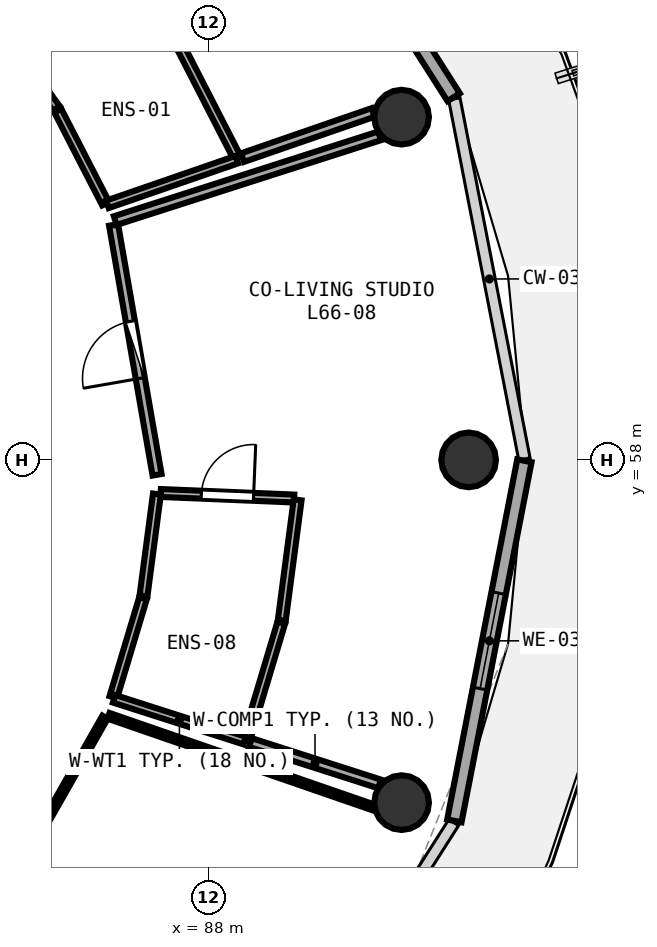
"""IFC4 building model, lengths in metres.
Left out: names, types, materials, properties, quantities, classifications, styles, units other than length and angle.
Written with IfcOpenShell. Run it as: python <this file> out.ifc"""

import sys

from ifc_helpers import new_model, si_unit, direction, frame, frame_2d, origin, origin_2d, place, context, subcontext, project, spatial, rectangle, circle, extrude, element, fill, save


model = new_model("IFC4")
c1 = context("Model", 3, precision=1e-05, world=origin(), true_north=direction((0.0, 1.0)))
c2 = subcontext(c1, "Body", "Model", "MODEL_VIEW")
j1 = project(units=[si_unit("LENGTHUNIT", "METRE"), si_unit("PLANEANGLEUNIT", "RADIAN")], contexts=[c1])
p1 = place(None, origin())
s1 = spatial("IfcSite", under=j1, at=p1, CompositionType="ELEMENT")
p2 = place(p1, origin())
s2 = spatial("IfcBuilding", under=s1, at=p2, CompositionType="ELEMENT")
p3 = place(p2, frame((0.0, 0.0, 259.95)))
s3 = spatial("IfcBuildingStorey", under=s2, at=p3, CompositionType="ELEMENT", Elevation=259.95)
for number, where, z_axis, x_axis in (
    (1, (92.28, 58.0, 0.0), (0.0, 0.0, 1.0), (1.0, 0.0, 0.0)),
    (2, (91.177, 63.636, 0.0), (0.0, 0.0, 1.0), (1.0, 0.0, 0.0)),
    (3, (91.177, 52.364, 0.0), (0.0, 0.0, 1.0), (1.0, 0.0, 0.0)),
):
    element("IfcColumn", number, at=place(p3, frame(where, z_axis=z_axis, x_axis=x_axis)), inside=s3, PredefinedType="COLUMN", context=c2, shape_type="SweptSolid", body=[
        extrude(circle(Radius=0.45, at=origin_2d()), origin(), (0.0, 0.0, 1.0), 3.75),
    ])
p4 = place(p3, frame((92.034, 63.964, 0.0), z_axis=(0.0, 0.0, 1.0), x_axis=(-0.537271968456, 0.843409053728, 0.0)))
e4 = element("IfcWall", 4, at=p4, inside=s3, PredefinedType="SOLIDWALL", context=c2, shape_type="SweptSolid", body=[
    extrude(rectangle(XDim=6.175, YDim=0.24, at=frame_2d((3.087, 0.0))), origin(), (0.0, 0.0, 1.0), 3.475),
])
p5 = place(p4, frame((2.613, 0.0, 0.0)))
e5 = element("IfcOpeningElement", 5, at=p5, cuts=e4, PredefinedType="OPENING", context=c2, shape_type="SweptSolid", body=[
    extrude(rectangle(XDim=0.95, YDim=2.1, at=frame_2d((0.475, 1.05))), frame((0.0, 0.13, 0.0), z_axis=(0.0, -1.0, 0.0), x_axis=(1.0, 0.0, 0.0)), (0.0, 0.0, 1.0), 0.26),
])
p6 = place(p4, frame((3.913, 0.0, 0.85)))
e6 = element("IfcOpeningElement", 6, at=p6, cuts=e4, PredefinedType="OPENING", context=c2, shape_type="SweptSolid", body=[
    extrude(rectangle(XDim=1.2, YDim=1.45, at=frame_2d((0.6, 0.725))), frame((0.0, 0.13, 0.0), z_axis=(0.0, -1.0, 0.0), x_axis=(1.0, 0.0, 0.0)), (0.0, 0.0, 1.0), 0.26),
])
p7 = place(p3, frame((92.045, 52.063, 0.0), z_axis=(0.0, 0.0, 1.0), x_axis=(0.190969309115, 0.981596008028, 0.0)))
e7 = element("IfcWall", 7, at=p7, inside=s3, PredefinedType="SOLIDWALL", context=c2, shape_type="SweptSolid", body=[
    extrude(rectangle(XDim=6.033, YDim=0.24, at=frame_2d((3.017, 0.0))), origin(), (0.0, 0.0, 1.0), 3.475),
])
p8 = place(p7, frame((2.216, 0.0, 0.85)))
e8 = element("IfcOpeningElement", 8, at=p8, cuts=e7, PredefinedType="OPENING", context=c2, shape_type="SweptSolid", body=[
    extrude(rectangle(XDim=1.6, YDim=1.45, at=frame_2d((0.8, 0.725))), frame((0.0, 0.13, 0.0), z_axis=(0.0, -1.0, 0.0), x_axis=(1.0, 0.0, 0.0)), (0.0, 0.0, 1.0), 0.26),
])
p9 = place(p3, frame((87.216, 57.456, 0.0), z_axis=(0.0, 0.0, 1.0), x_axis=(0.999139994921, -0.041464087462, 0.0)))
e9 = element("IfcWall", 9, at=p9, inside=s3, PredefinedType="PLUMBINGWALL", context=c2, shape_type="SweptSolid", body=[
    extrude(rectangle(XDim=2.196, YDim=0.13, at=frame_2d((1.098, 0.0))), origin(), (0.0, 0.0, 1.0), 3.175),
])
p10 = place(p9, frame((0.668, 0.0, 0.0)))
e10 = element("IfcOpeningElement", 10, at=p10, cuts=e9, PredefinedType="OPENING", context=c2, shape_type="SweptSolid", body=[
    extrude(rectangle(XDim=0.86, YDim=2.05, at=frame_2d((0.43, 1.025))), frame((0.0, 0.075, 0.0), z_axis=(0.0, -1.0, 0.0), x_axis=(1.0, 0.0, 0.0)), (0.0, 0.0, 1.0), 0.15),
])
p11 = place(p3, frame((87.156, 57.755, 0.0), z_axis=(0.0, 0.0, 1.0), x_axis=(-0.171570913007, 0.985171772743, 0.0)))
e11 = element("IfcWall", 11, at=p11, inside=s3, PredefinedType="PARTITIONING", context=c2, shape_type="SweptSolid", body=[
    extrude(rectangle(XDim=4.171, YDim=0.15, at=frame_2d((2.085, 0.0))), origin(), (0.0, 0.0, 1.0), 3.075),
])
p12 = place(p11, frame((1.61, 0.0, 0.0)))
e12 = element("IfcOpeningElement", 12, at=p12, cuts=e11, PredefinedType="OPENING", context=c2, shape_type="SweptSolid", body=[
    extrude(rectangle(XDim=0.95, YDim=2.08, at=frame_2d((0.475, 1.04))), frame((0.0, 0.085, 0.0), z_axis=(0.0, -1.0, 0.0), x_axis=(1.0, 0.0, 0.0)), (0.0, 0.0, 1.0), 0.17),
])
p13 = place(p3, frame((86.311, 62.214, 0.0), z_axis=(0.0, 0.0, 1.0), x_axis=(-0.457623641393, 0.889145996357, 0.0)))
e13 = element("IfcWall", 13, at=p13, inside=s3, PredefinedType="PLUMBINGWALL", context=c2, shape_type="SweptSolid", body=[
    extrude(rectangle(XDim=1.721, YDim=0.13, at=frame_2d((0.86, 0.0))), origin(), (0.0, 0.0, 1.0), 3.235),
])
p14 = place(p3, frame((85.502, 63.778, 0.0), z_axis=(0.0, 0.0, 1.0), x_axis=(-0.587439614451, 0.809268002193, 0.0)))
e14 = element("IfcWall", 14, at=p14, inside=s3, PredefinedType="PLUMBINGWALL", context=c2, shape_type="SweptSolid", body=[
    extrude(rectangle(XDim=1.746, YDim=0.13, at=frame_2d((0.873, 0.0))), origin(), (0.0, 0.0, 1.0), 3.075),
])
p15 = place(p3, frame((87.548, 64.772, 0.0), z_axis=(0.0, 0.0, 1.0), x_axis=(0.456453063126, -0.889747492923, 0.0)))
e15 = element("IfcWall", 15, at=p15, inside=s3, PredefinedType="PLUMBINGWALL", context=c2, shape_type="SweptSolid", body=[
    extrude(rectangle(XDim=2.035, YDim=0.13, at=frame_2d((1.017, 0.0))), origin(), (0.0, 0.0, 1.0), 3.075),
])
p16 = place(p3, frame((88.467, 62.938, 0.0), z_axis=(0.0, 0.0, 1.0), x_axis=(-0.94520115701, -0.326488549244, 0.0)))
e16 = element("IfcWall", 16, at=p16, inside=s3, PredefinedType="PLUMBINGWALL", context=c2, shape_type="SweptSolid", body=[
    extrude(rectangle(XDim=2.251, YDim=0.13, at=frame_2d((1.126, 0.0))), origin(), (0.0, 0.0, 1.0), 3.175),
])
p17 = place(p3, frame((90.709, 63.713, 0.0), z_axis=(0.0, 0.0, 1.0), x_axis=(-0.945132905081, -0.326686075207, 0.0)))
e17 = element("IfcWall", 17, at=p17, inside=s3, PredefinedType="PARTITIONING", context=c2, shape_type="SweptSolid", body=[
    extrude(rectangle(XDim=2.272, YDim=0.15, at=frame_2d((1.136, 0.0))), origin(), (0.0, 0.0, 1.0), 3.075),
])
p18 = place(p3, frame((84.994, 51.472, 0.0), z_axis=(0.0, 0.0, 1.0), x_axis=(0.494277588427, 0.869304127207, 0.0)))
e18 = element("IfcWall", 18, at=p18, inside=s3, PredefinedType="PARTITIONING", context=c2, shape_type="SweptSolid", body=[
    extrude(rectangle(XDim=2.643, YDim=0.1, at=frame_2d((1.322, 0.0))), origin(), (0.0, 0.0, 1.0), 3.075),
])
p19 = place(p3, frame((86.358, 53.791, 0.0), z_axis=(0.0, 0.0, 1.0), x_axis=(0.945103281494, -0.326771766388, 0.0)))
e19 = element("IfcWall", 19, at=p19, inside=s3, PredefinedType="PARTITIONING", context=c2, shape_type="SweptSolid", body=[
    extrude(rectangle(XDim=4.604, YDim=0.1, at=frame_2d((2.302, 0.0))), origin(), (0.0, 0.0, 1.0), 3.075),
])
p20 = place(p3, frame((86.436, 54.096, 0.0), z_axis=(0.0, 0.0, 1.0), x_axis=(0.287308367232, 0.957838139833, 0.0)))
e20 = element("IfcWall", 20, at=p20, inside=s3, PredefinedType="PLUMBINGWALL", context=c2, shape_type="SweptSolid", body=[
    extrude(rectangle(XDim=1.7, YDim=0.13, at=frame_2d((0.85, 0.0))), origin(), (0.0, 0.0, 1.0), 3.48),
])
p21 = place(p3, frame((86.933, 55.764, 0.0), z_axis=(0.0, 0.0, 1.0), x_axis=(0.130686363399, 0.991423761275, 0.0)))
e21 = element("IfcWall", 21, at=p21, inside=s3, PredefinedType="PLUMBINGWALL", context=c2, shape_type="SweptSolid", body=[
    extrude(rectangle(XDim=1.689, YDim=0.13, at=frame_2d((0.844, 0.0))), origin(), (0.0, 0.0, 1.0), 3.48),
])
p22 = place(p3, frame((89.467, 57.342, 0.0), z_axis=(0.0, 0.0, 1.0), x_axis=(-0.130467152696, -0.991452632286, 0.0)))
e22 = element("IfcWall", 22, at=p22, inside=s3, PredefinedType="PLUMBINGWALL", context=c2, shape_type="SweptSolid", body=[
    extrude(rectangle(XDim=1.999, YDim=0.13, at=frame_2d((0.999, 0.0))), origin(), (0.0, 0.0, 1.0), 3.48),
])
p23 = place(p3, frame((89.198, 55.322, 0.0), z_axis=(0.0, 0.0, 1.0), x_axis=(-0.286890981069, -0.957963237803, 0.0)))
e23 = element("IfcWall", 23, at=p23, inside=s3, PredefinedType="PLUMBINGWALL", context=c2, shape_type="SweptSolid", body=[
    extrude(rectangle(XDim=2.01, YDim=0.13, at=frame_2d((1.005, 0.0))), origin(), (0.0, 0.0, 1.0), 3.48),
])
p24 = place(p3, frame((88.597, 53.383, 0.0), z_axis=(0.0, 0.0, 1.0), x_axis=(-0.952372601519, 0.304936760454, 0.0)))
e24 = element("IfcWall", 24, at=p24, inside=s3, PredefinedType="PLUMBINGWALL", context=c2, shape_type="SweptSolid", body=[
    extrude(rectangle(XDim=2.255, YDim=0.13, at=frame_2d((1.128, 0.0))), origin(), (0.0, 0.0, 1.0), 3.175),
])
p25 = place(p3, frame((86.468, 61.935, 0.0), z_axis=(0.0, 0.0, 1.0), x_axis=(0.95227750557, 0.305233602976, 0.0)))
e25 = element("IfcWall", 25, at=p25, inside=s3, PredefinedType="PARTITIONING", context=c2, shape_type="SweptSolid", body=[
    extrude(rectangle(XDim=4.565, YDim=0.15, at=frame_2d((2.283, 0.0))), origin(), (0.0, 0.0, 1.0), 3.175),
])
p26 = place(p3, frame((90.816, 52.671, 0.0), z_axis=(0.0, 0.0, 1.0), x_axis=(-0.952285550261, 0.305208503755, 0.0)))
e26 = element("IfcWall", 26, at=p26, inside=s3, PredefinedType="PARTITIONING", context=c2, shape_type="SweptSolid", body=[
    extrude(rectangle(XDim=2.231, YDim=0.15, at=frame_2d((1.115, 0.0))), origin(), (0.0, 0.0, 1.0), 3.235),
])
p27 = place(p8, origin())
e27 = element("IfcWindow", 27, at=p27, inside=s3, PartitioningType="SINGLE_PANEL", PredefinedType="WINDOW", context=c2, shape_type="SweptSolid", body=[
    extrude(rectangle(XDim=1.6, YDim=1.45, at=frame_2d((0.8, 0.725))), frame((0.0, 0.03, 0.0), z_axis=(0.0, -1.0, 0.0), x_axis=(1.0, 0.0, 0.0)), (0.0, 0.0, 1.0), 0.06),
])
fill(e8, e27)
p28 = place(p10, origin())
e28 = element("IfcDoor", 28, at=p28, inside=s3, OperationType="SINGLE_SWING_RIGHT", PredefinedType="DOOR", context=c2, shape_type="SweptSolid", body=[
    extrude(rectangle(XDim=0.86, YDim=2.05, at=frame_2d((0.43, 1.025))), frame((0.0, 0.025, 0.0), z_axis=(0.0, -1.0, 0.0), x_axis=(1.0, 0.0, 0.0)), (0.0, 0.0, 1.0), 0.05),
])
fill(e10, e28)
p29 = place(p12, origin())
e29 = element("IfcDoor", 29, at=p29, inside=s3, OperationType="SINGLE_SWING_LEFT", PredefinedType="DOOR", context=c2, shape_type="SweptSolid", body=[
    extrude(rectangle(XDim=0.95, YDim=2.08, at=frame_2d((0.475, 1.04))), frame((0.0, 0.025, 0.0), z_axis=(0.0, -1.0, 0.0), x_axis=(1.0, 0.0, 0.0)), (0.0, 0.0, 1.0), 0.05),
])
fill(e12, e29)
save(model, sys.argv[1])
